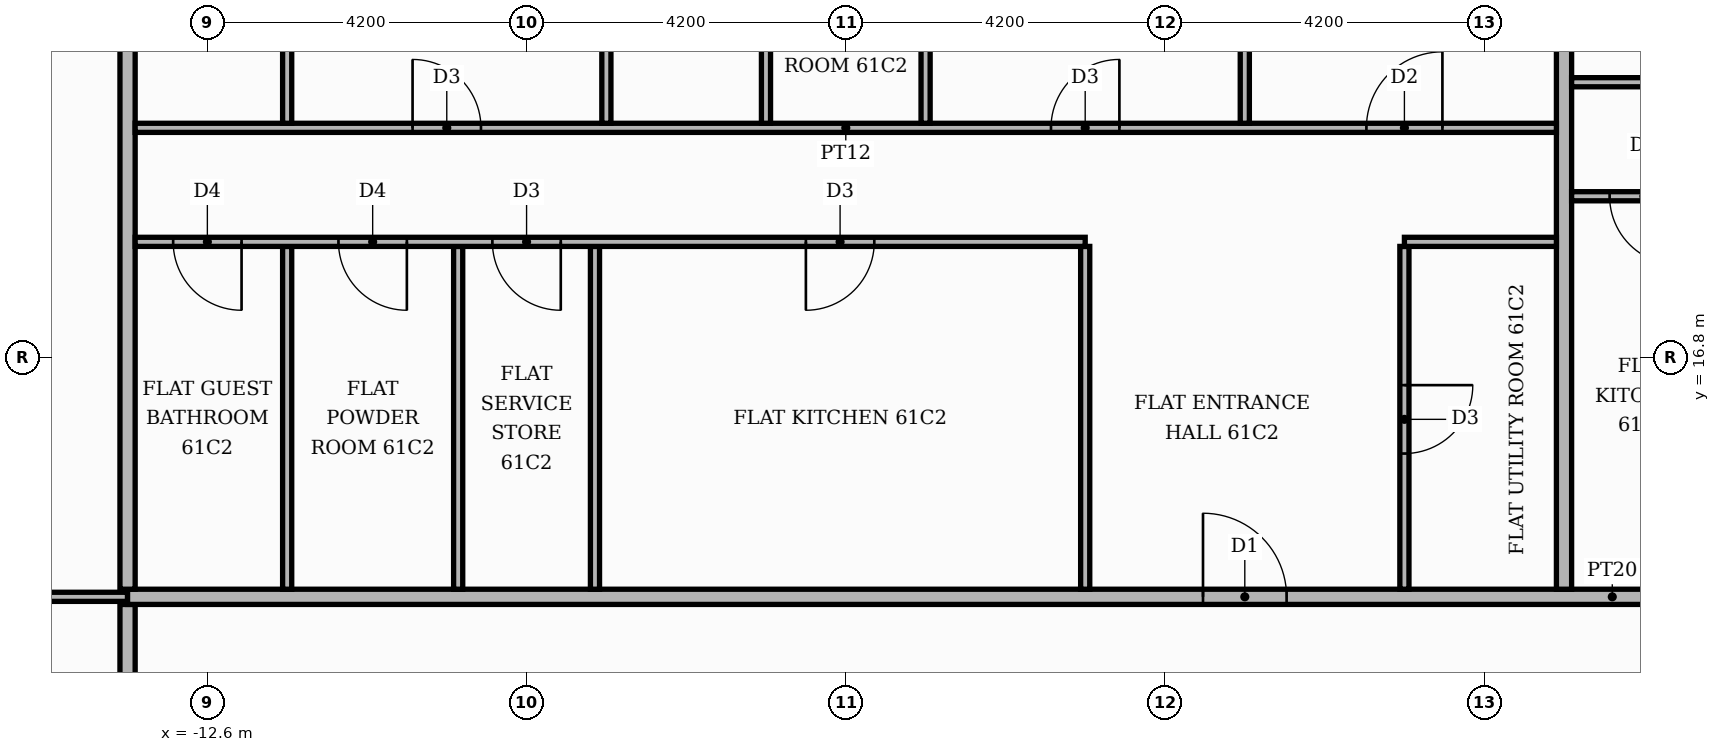
"""IFC4 building model, lengths in metres.
Left out: names, types, materials, properties, quantities, classifications, styles, units other than length and angle.
Written with IfcOpenShell. Run it as: python <this file> out.ifc"""

import sys

from ifc_helpers import new_model, si_unit, direction, frame, frame_2d, origin, place, context, subcontext, project, spatial, rectangle, extrude, element, fill, save


model = new_model("IFC4")
c1 = context("Model", 3, precision=1e-05, world=origin(), true_north=direction((0.0, 1.0)))
c2 = subcontext(c1, "Body", "Model", "MODEL_VIEW")
j1 = project(units=[si_unit("LENGTHUNIT", "METRE"), si_unit("PLANEANGLEUNIT", "RADIAN")], contexts=[c1])
p1 = place(None, origin())
s1 = spatial("IfcSite", under=j1, at=p1, CompositionType="ELEMENT")
p2 = place(p1, origin())
s2 = spatial("IfcBuilding", under=s1, at=p2, CompositionType="ELEMENT")
p3 = place(p2, frame((0.0, 0.0, 256.2)))
s3 = spatial("IfcBuildingStorey", under=s2, at=p3, CompositionType="ELEMENT", Elevation=256.2)
p4 = place(p3, frame((-13.65, 11.1, 0.0), z_axis=(0.0, 0.0, 1.0), x_axis=(0.0, 1.0, 0.0)))
e1 = element("IfcWall", 1, at=p4, inside=s3, PredefinedType="PARTITIONING", context=c2, shape_type="SweptSolid", body=[
    extrude(rectangle(XDim=2.45, YDim=0.2, at=frame_2d((1.225, 0.0))), origin(), (0.0, 0.0, 1.0), 3.48),
])
p5 = place(p3, frame((-20.72, 13.65, 0.0), z_axis=(0.0, 0.0, 1.0), x_axis=(1.0, 0.0, 0.0)))
e2 = element("IfcWall", 2, at=p5, inside=s3, PredefinedType="PARTITIONING", context=c2, shape_type="SweptSolid", body=[
    extrude(rectangle(XDim=7.07, YDim=0.12, at=frame_2d((3.535, 0.0))), origin(), (0.0, 0.0, 1.0), 3.48),
])
p6 = place(p5, frame((3.085, 0.0, 0.0)))
e3 = element("IfcOpeningElement", 3, at=p6, cuts=e2, PredefinedType="OPENING", context=c2, shape_type="SweptSolid", body=[
    extrude(rectangle(XDim=0.9, YDim=2.1, at=frame_2d((0.45, 1.05))), frame((0.0, 0.07, 0.0), z_axis=(0.0, -1.0, 0.0), x_axis=(1.0, 0.0, 0.0)), (0.0, 0.0, 1.0), 0.14),
])
p7 = place(p3, frame((-13.65, 13.65, 0.0), z_axis=(0.0, 0.0, 1.0), x_axis=(1.0, 0.0, 0.0)))
e4 = element("IfcWall", 4, at=p7, inside=s3, PredefinedType="PARTITIONING", context=c2, shape_type="SweptSolid", body=[
    extrude(rectangle(XDim=39.07, YDim=0.2, at=frame_2d((19.535, 0.0))), origin(), (0.0, 0.0, 1.0), 3.48),
])
p8 = place(p7, frame((24.65, 0.0, 0.0)))
e5 = element("IfcOpeningElement", 5, at=p8, cuts=e4, PredefinedType="OPENING", context=c2, shape_type="SweptSolid", body=[
    extrude(rectangle(XDim=1.1, YDim=2.4, at=frame_2d((0.55, 1.2))), frame((0.0, 0.11, 0.0), z_axis=(0.0, -1.0, 0.0), x_axis=(1.0, 0.0, 0.0)), (0.0, 0.0, 1.0), 0.22),
])
p9 = place(p7, frame((14.15, 0.0, 0.0)))
e6 = element("IfcOpeningElement", 6, at=p9, cuts=e4, PredefinedType="OPENING", context=c2, shape_type="SweptSolid", body=[
    extrude(rectangle(XDim=1.1, YDim=2.4, at=frame_2d((0.55, 1.2))), frame((0.0, 0.11, 0.0), z_axis=(0.0, -1.0, 0.0), x_axis=(1.0, 0.0, 0.0)), (0.0, 0.0, 1.0), 0.22),
])
p10 = place(p3, frame((-13.65, 13.75, 0.0), z_axis=(0.0, 0.0, 1.0), x_axis=(0.0, 1.0, 0.0)))
e7 = element("IfcWall", 7, at=p10, inside=s3, PredefinedType="PARTITIONING", context=c2, shape_type="SweptSolid", body=[
    extrude(rectangle(XDim=11.67, YDim=0.2, at=frame_2d((5.835, 0.0))), origin(), (0.0, 0.0, 1.0), 3.48),
])
for number, where, z_axis, x_axis in (
    (8, (-11.55, 13.75, 0.0), (0.0, 0.0, 1.0), (0.0, 1.0, 0.0)),
    (9, (-9.3, 13.75, 0.0), (0.0, 0.0, 1.0), (0.0, 1.0, 0.0)),
    (10, (-7.5, 13.75, 0.0), (0.0, 0.0, 1.0), (0.0, 1.0, 0.0)),
    (11, (-1.05, 13.75, 0.0), (0.0, 0.0, 1.0), (0.0, 1.0, 0.0)),
):
    element("IfcWall", number, at=place(p3, frame(where, z_axis=z_axis, x_axis=x_axis)), inside=s3, PredefinedType="PARTITIONING", context=c2, shape_type="SweptSolid", body=[
        extrude(rectangle(XDim=4.51, YDim=0.12, at=frame_2d((2.255, 0.0))), origin(), (0.0, 0.0, 1.0), 3.48),
    ])
p11 = place(p3, frame((3.15, 13.75, 0.0), z_axis=(0.0, 0.0, 1.0), x_axis=(0.0, 1.0, 0.0)))
e12 = element("IfcWall", 12, at=p11, inside=s3, PredefinedType="PARTITIONING", context=c2, shape_type="SweptSolid", body=[
    extrude(rectangle(XDim=4.51, YDim=0.12, at=frame_2d((2.255, 0.0))), origin(), (0.0, 0.0, 1.0), 3.48),
])
p12 = place(p11, frame((1.785, 0.0, 0.0)))
e13 = element("IfcOpeningElement", 13, at=p12, cuts=e12, PredefinedType="OPENING", context=c2, shape_type="SweptSolid", body=[
    extrude(rectangle(XDim=0.9, YDim=2.1, at=frame_2d((0.45, 1.05))), frame((0.0, 0.07, 0.0), z_axis=(0.0, -1.0, 0.0), x_axis=(1.0, 0.0, 0.0)), (0.0, 0.0, 1.0), 0.14),
])
p13 = place(p3, frame((5.25, 13.75, 0.0), z_axis=(0.0, 0.0, 1.0), x_axis=(0.0, 1.0, 0.0)))
e14 = element("IfcWall", 14, at=p13, inside=s3, PredefinedType="PARTITIONING", context=c2, shape_type="SweptSolid", body=[
    extrude(rectangle(XDim=11.67, YDim=0.2, at=frame_2d((5.835, 0.0))), origin(), (0.0, 0.0, 1.0), 3.48),
])
p14 = place(p3, frame((-13.55, 18.32, 0.0), z_axis=(0.0, 0.0, 1.0), x_axis=(1.0, 0.0, 0.0)))
e15 = element("IfcWall", 15, at=p14, inside=s3, PredefinedType="PARTITIONING", context=c2, shape_type="SweptSolid", body=[
    extrude(rectangle(XDim=12.5, YDim=0.12, at=frame_2d((6.25, 0.0))), origin(), (0.0, 0.0, 1.0), 3.48),
])
p15 = place(p14, frame((8.825, 0.0, 0.0)))
e16 = element("IfcOpeningElement", 16, at=p15, cuts=e15, PredefinedType="OPENING", context=c2, shape_type="SweptSolid", body=[
    extrude(rectangle(XDim=0.9, YDim=2.1, at=frame_2d((0.45, 1.05))), frame((0.0, 0.07, 0.0), z_axis=(0.0, -1.0, 0.0), x_axis=(1.0, 0.0, 0.0)), (0.0, 0.0, 1.0), 0.14),
])
p16 = place(p14, frame((4.7, 0.0, 0.0)))
e17 = element("IfcOpeningElement", 17, at=p16, cuts=e15, PredefinedType="OPENING", context=c2, shape_type="SweptSolid", body=[
    extrude(rectangle(XDim=0.9, YDim=2.1, at=frame_2d((0.45, 1.05))), frame((0.0, 0.07, 0.0), z_axis=(0.0, -1.0, 0.0), x_axis=(1.0, 0.0, 0.0)), (0.0, 0.0, 1.0), 0.14),
])
p17 = place(p14, frame((2.675, 0.0, 0.0)))
e18 = element("IfcOpeningElement", 18, at=p17, cuts=e15, PredefinedType="OPENING", context=c2, shape_type="SweptSolid", body=[
    extrude(rectangle(XDim=0.9, YDim=2.1, at=frame_2d((0.45, 1.05))), frame((0.0, 0.07, 0.0), z_axis=(0.0, -1.0, 0.0), x_axis=(1.0, 0.0, 0.0)), (0.0, 0.0, 1.0), 0.14),
])
p18 = place(p14, frame((0.5, 0.0, 0.0)))
e19 = element("IfcOpeningElement", 19, at=p18, cuts=e15, PredefinedType="OPENING", context=c2, shape_type="SweptSolid", body=[
    extrude(rectangle(XDim=0.9, YDim=2.1, at=frame_2d((0.45, 1.05))), frame((0.0, 0.07, 0.0), z_axis=(0.0, -1.0, 0.0), x_axis=(1.0, 0.0, 0.0)), (0.0, 0.0, 1.0), 0.14),
])
p19 = place(p3, frame((3.15, 18.32, 0.0), z_axis=(0.0, 0.0, 1.0), x_axis=(1.0, 0.0, 0.0)))
e20 = element("IfcWall", 20, at=p19, inside=s3, PredefinedType="PARTITIONING", context=c2, shape_type="SweptSolid", body=[
    extrude(rectangle(XDim=2.0, YDim=0.12, at=frame_2d((1.0, 0.0))), origin(), (0.0, 0.0, 1.0), 3.48),
])
p20 = place(p3, frame((5.35, 18.92, 0.0), z_axis=(0.0, 0.0, 1.0), x_axis=(1.0, 0.0, 0.0)))
e21 = element("IfcWall", 21, at=p20, inside=s3, PredefinedType="PARTITIONING", context=c2, shape_type="SweptSolid", body=[
    extrude(rectangle(XDim=4.1, YDim=0.12, at=frame_2d((2.05, 0.0))), origin(), (0.0, 0.0, 1.0), 3.48),
])
p21 = place(p20, frame((0.5, 0.0, 0.0)))
e22 = element("IfcOpeningElement", 22, at=p21, cuts=e21, PredefinedType="OPENING", context=c2, shape_type="SweptSolid", body=[
    extrude(rectangle(XDim=0.9, YDim=2.1, at=frame_2d((0.45, 1.05))), frame((0.0, 0.07, 0.0), z_axis=(0.0, -1.0, 0.0), x_axis=(1.0, 0.0, 0.0)), (0.0, 0.0, 1.0), 0.14),
])
p22 = place(p3, frame((-13.55, 19.82, 0.0), z_axis=(0.0, 0.0, 1.0), x_axis=(1.0, 0.0, 0.0)))
e23 = element("IfcWall", 23, at=p22, inside=s3, PredefinedType="PARTITIONING", context=c2, shape_type="SweptSolid", body=[
    extrude(rectangle(XDim=18.7, YDim=0.12, at=frame_2d((9.35, 0.0))), origin(), (0.0, 0.0, 1.0), 3.48),
])
p23 = place(p22, frame((16.2, 0.0, 0.0)))
e24 = element("IfcOpeningElement", 24, at=p23, cuts=e23, PredefinedType="OPENING", context=c2, shape_type="SweptSolid", body=[
    extrude(rectangle(XDim=1.0, YDim=2.1, at=frame_2d((0.5, 1.05))), frame((0.0, 0.07, 0.0), z_axis=(0.0, -1.0, 0.0), x_axis=(1.0, 0.0, 0.0)), (0.0, 0.0, 1.0), 0.14),
])
p24 = place(p22, frame((12.05, 0.0, 0.0)))
e25 = element("IfcOpeningElement", 25, at=p24, cuts=e23, PredefinedType="OPENING", context=c2, shape_type="SweptSolid", body=[
    extrude(rectangle(XDim=0.9, YDim=2.1, at=frame_2d((0.45, 1.05))), frame((0.0, 0.07, 0.0), z_axis=(0.0, -1.0, 0.0), x_axis=(1.0, 0.0, 0.0)), (0.0, 0.0, 1.0), 0.14),
])
p25 = place(p22, frame((3.65, 0.0, 0.0)))
e26 = element("IfcOpeningElement", 26, at=p25, cuts=e23, PredefinedType="OPENING", context=c2, shape_type="SweptSolid", body=[
    extrude(rectangle(XDim=0.9, YDim=2.1, at=frame_2d((0.45, 1.05))), frame((0.0, 0.07, 0.0), z_axis=(0.0, -1.0, 0.0), x_axis=(1.0, 0.0, 0.0)), (0.0, 0.0, 1.0), 0.14),
])
p26 = place(p3, frame((-11.55, 19.88, 0.0), z_axis=(0.0, 0.0, 1.0), x_axis=(0.0, 1.0, 0.0)))
e27 = element("IfcWall", 27, at=p26, inside=s3, PredefinedType="PARTITIONING", context=c2, shape_type="SweptSolid", body=[
    extrude(rectangle(XDim=5.54, YDim=0.12, at=frame_2d((2.77, 0.0))), origin(), (0.0, 0.0, 1.0), 3.48),
])
p27 = place(p26, frame((2.44, 0.0, 0.0)))
e28 = element("IfcOpeningElement", 28, at=p27, cuts=e27, PredefinedType="OPENING", context=c2, shape_type="SweptSolid", body=[
    extrude(rectangle(XDim=0.9, YDim=2.1, at=frame_2d((0.45, 1.05))), frame((0.0, 0.07, 0.0), z_axis=(0.0, -1.0, 0.0), x_axis=(1.0, 0.0, 0.0)), (0.0, 0.0, 1.0), 0.14),
])
p28 = place(p3, frame((-7.35, 19.88, 0.0), z_axis=(0.0, 0.0, 1.0), x_axis=(0.0, 1.0, 0.0)))
e29 = element("IfcWall", 29, at=p28, inside=s3, PredefinedType="PARTITIONING", context=c2, shape_type="SweptSolid", body=[
    extrude(rectangle(XDim=5.54, YDim=0.12, at=frame_2d((2.77, 0.0))), origin(), (0.0, 0.0, 1.0), 3.48),
])
p29 = place(p3, frame((-5.25, 19.88, 0.0), z_axis=(0.0, 0.0, 1.0), x_axis=(0.0, 1.0, 0.0)))
e30 = element("IfcWall", 30, at=p29, inside=s3, PredefinedType="PARTITIONING", context=c2, shape_type="SweptSolid", body=[
    extrude(rectangle(XDim=5.54, YDim=0.12, at=frame_2d((2.77, 0.0))), origin(), (0.0, 0.0, 1.0), 3.48),
])
p30 = place(p29, frame((2.44, 0.0, 0.0)))
e31 = element("IfcOpeningElement", 31, at=p30, cuts=e30, PredefinedType="OPENING", context=c2, shape_type="SweptSolid", body=[
    extrude(rectangle(XDim=0.9, YDim=2.1, at=frame_2d((0.45, 1.05))), frame((0.0, 0.07, 0.0), z_axis=(0.0, -1.0, 0.0), x_axis=(1.0, 0.0, 0.0)), (0.0, 0.0, 1.0), 0.14),
])
p31 = place(p3, frame((-3.15, 19.88, 0.0), z_axis=(0.0, 0.0, 1.0), x_axis=(0.0, 1.0, 0.0)))
e32 = element("IfcWall", 32, at=p31, inside=s3, PredefinedType="PARTITIONING", context=c2, shape_type="SweptSolid", body=[
    extrude(rectangle(XDim=5.54, YDim=0.12, at=frame_2d((2.77, 0.0))), origin(), (0.0, 0.0, 1.0), 3.48),
])
p32 = place(p31, frame((2.44, 0.0, 0.0)))
e33 = element("IfcOpeningElement", 33, at=p32, cuts=e32, PredefinedType="OPENING", context=c2, shape_type="SweptSolid", body=[
    extrude(rectangle(XDim=0.9, YDim=2.1, at=frame_2d((0.45, 1.05))), frame((0.0, 0.07, 0.0), z_axis=(0.0, -1.0, 0.0), x_axis=(1.0, 0.0, 0.0)), (0.0, 0.0, 1.0), 0.14),
])
p33 = place(p3, frame((1.05, 19.88, 0.0), z_axis=(0.0, 0.0, 1.0), x_axis=(0.0, 1.0, 0.0)))
e34 = element("IfcWall", 34, at=p33, inside=s3, PredefinedType="PARTITIONING", context=c2, shape_type="SweptSolid", body=[
    extrude(rectangle(XDim=5.54, YDim=0.12, at=frame_2d((2.77, 0.0))), origin(), (0.0, 0.0, 1.0), 3.48),
])
p34 = place(p3, frame((5.35, 20.42, 0.0), z_axis=(0.0, 0.0, 1.0), x_axis=(1.0, 0.0, 0.0)))
e35 = element("IfcWall", 35, at=p34, inside=s3, PredefinedType="PARTITIONING", context=c2, shape_type="SweptSolid", body=[
    extrude(rectangle(XDim=15.369, YDim=0.12, at=frame_2d((7.685, 0.0))), origin(), (0.0, 0.0, 1.0), 3.48),
])
p35 = place(p34, frame((8.85, 0.0, 0.0)))
e36 = element("IfcOpeningElement", 36, at=p35, cuts=e35, PredefinedType="OPENING", context=c2, shape_type="SweptSolid", body=[
    extrude(rectangle(XDim=1.0, YDim=2.1, at=frame_2d((0.5, 1.05))), frame((0.0, 0.07, 0.0), z_axis=(0.0, -1.0, 0.0), x_axis=(1.0, 0.0, 0.0)), (0.0, 0.0, 1.0), 0.14),
])
p36 = place(p34, frame((5.75, 0.0, 0.0)))
e37 = element("IfcOpeningElement", 37, at=p36, cuts=e35, PredefinedType="OPENING", context=c2, shape_type="SweptSolid", body=[
    extrude(rectangle(XDim=0.9, YDim=2.1, at=frame_2d((0.45, 1.05))), frame((0.0, 0.07, 0.0), z_axis=(0.0, -1.0, 0.0), x_axis=(1.0, 0.0, 0.0)), (0.0, 0.0, 1.0), 0.14),
])
p37 = place(p21, frame((0.9, 0.0, 0.0), z_axis=(0.0, 0.0, 1.0), x_axis=(-1.0, 0.0, 0.0)))
e38 = element("IfcDoor", 38, at=p37, inside=s3, OperationType="SINGLE_SWING_RIGHT", PredefinedType="DOOR", context=c2, shape_type="SweptSolid", body=[
    extrude(rectangle(XDim=0.9, YDim=2.1, at=frame_2d((0.45, 1.05))), frame((0.0, 0.025, 0.0), z_axis=(0.0, -1.0, 0.0), x_axis=(1.0, 0.0, 0.0)), (0.0, 0.0, 1.0), 0.05),
])
fill(e22, e38)
p38 = place(p9, origin())
e39 = element("IfcDoor", 39, at=p38, inside=s3, OperationType="SINGLE_SWING_LEFT", PredefinedType="DOOR", context=c2, shape_type="SweptSolid", body=[
    extrude(rectangle(XDim=1.1, YDim=2.4, at=frame_2d((0.55, 1.2))), frame((0.0, 0.025, 0.0), z_axis=(0.0, -1.0, 0.0), x_axis=(1.0, 0.0, 0.0)), (0.0, 0.0, 1.0), 0.05),
])
fill(e6, e39)
p39 = place(p12, frame((0.9, 0.0, 0.0), z_axis=(0.0, 0.0, 1.0), x_axis=(-1.0, 0.0, 0.0)))
e40 = element("IfcDoor", 40, at=p39, inside=s3, OperationType="SINGLE_SWING_RIGHT", PredefinedType="DOOR", context=c2, shape_type="SweptSolid", body=[
    extrude(rectangle(XDim=0.9, YDim=2.1, at=frame_2d((0.45, 1.05))), frame((0.0, 0.025, 0.0), z_axis=(0.0, -1.0, 0.0), x_axis=(1.0, 0.0, 0.0)), (0.0, 0.0, 1.0), 0.05),
])
fill(e13, e40)
p40 = place(p15, frame((0.9, 0.0, 0.0), z_axis=(0.0, 0.0, 1.0), x_axis=(-1.0, 0.0, 0.0)))
e41 = element("IfcDoor", 41, at=p40, inside=s3, OperationType="SINGLE_SWING_LEFT", PredefinedType="DOOR", context=c2, shape_type="SweptSolid", body=[
    extrude(rectangle(XDim=0.9, YDim=2.1, at=frame_2d((0.45, 1.05))), frame((0.0, 0.025, 0.0), z_axis=(0.0, -1.0, 0.0), x_axis=(1.0, 0.0, 0.0)), (0.0, 0.0, 1.0), 0.05),
])
fill(e16, e41)
p41 = place(p16, frame((0.9, 0.0, 0.0), z_axis=(0.0, 0.0, 1.0), x_axis=(-1.0, 0.0, 0.0)))
e42 = element("IfcDoor", 42, at=p41, inside=s3, OperationType="SINGLE_SWING_RIGHT", PredefinedType="DOOR", context=c2, shape_type="SweptSolid", body=[
    extrude(rectangle(XDim=0.9, YDim=2.1, at=frame_2d((0.45, 1.05))), frame((0.0, 0.025, 0.0), z_axis=(0.0, -1.0, 0.0), x_axis=(1.0, 0.0, 0.0)), (0.0, 0.0, 1.0), 0.05),
])
fill(e17, e42)
p42 = place(p17, frame((0.9, 0.0, 0.0), z_axis=(0.0, 0.0, 1.0), x_axis=(-1.0, 0.0, 0.0)))
e43 = element("IfcDoor", 43, at=p42, inside=s3, OperationType="SINGLE_SWING_RIGHT", PredefinedType="DOOR", context=c2, shape_type="SweptSolid", body=[
    extrude(rectangle(XDim=0.9, YDim=2.1, at=frame_2d((0.45, 1.05))), frame((0.0, 0.025, 0.0), z_axis=(0.0, -1.0, 0.0), x_axis=(1.0, 0.0, 0.0)), (0.0, 0.0, 1.0), 0.05),
])
fill(e18, e43)
p43 = place(p18, frame((0.9, 0.0, 0.0), z_axis=(0.0, 0.0, 1.0), x_axis=(-1.0, 0.0, 0.0)))
e44 = element("IfcDoor", 44, at=p43, inside=s3, OperationType="SINGLE_SWING_RIGHT", PredefinedType="DOOR", context=c2, shape_type="SweptSolid", body=[
    extrude(rectangle(XDim=0.9, YDim=2.1, at=frame_2d((0.45, 1.05))), frame((0.0, 0.025, 0.0), z_axis=(0.0, -1.0, 0.0), x_axis=(1.0, 0.0, 0.0)), (0.0, 0.0, 1.0), 0.05),
])
fill(e19, e44)
p44 = place(p23, origin())
e45 = element("IfcDoor", 45, at=p44, inside=s3, OperationType="SINGLE_SWING_RIGHT", PredefinedType="DOOR", context=c2, shape_type="SweptSolid", body=[
    extrude(rectangle(XDim=1.0, YDim=2.1, at=frame_2d((0.5, 1.05))), frame((0.0, 0.025, 0.0), z_axis=(0.0, -1.0, 0.0), x_axis=(1.0, 0.0, 0.0)), (0.0, 0.0, 1.0), 0.05),
])
fill(e24, e45)
p45 = place(p24, origin())
e46 = element("IfcDoor", 46, at=p45, inside=s3, OperationType="SINGLE_SWING_RIGHT", PredefinedType="DOOR", context=c2, shape_type="SweptSolid", body=[
    extrude(rectangle(XDim=0.9, YDim=2.1, at=frame_2d((0.45, 1.05))), frame((0.0, 0.025, 0.0), z_axis=(0.0, -1.0, 0.0), x_axis=(1.0, 0.0, 0.0)), (0.0, 0.0, 1.0), 0.05),
])
fill(e25, e46)
p46 = place(p25, origin())
e47 = element("IfcDoor", 47, at=p46, inside=s3, OperationType="SINGLE_SWING_LEFT", PredefinedType="DOOR", context=c2, shape_type="SweptSolid", body=[
    extrude(rectangle(XDim=0.9, YDim=2.1, at=frame_2d((0.45, 1.05))), frame((0.0, 0.025, 0.0), z_axis=(0.0, -1.0, 0.0), x_axis=(1.0, 0.0, 0.0)), (0.0, 0.0, 1.0), 0.05),
])
fill(e26, e47)
save(model, sys.argv[1])
